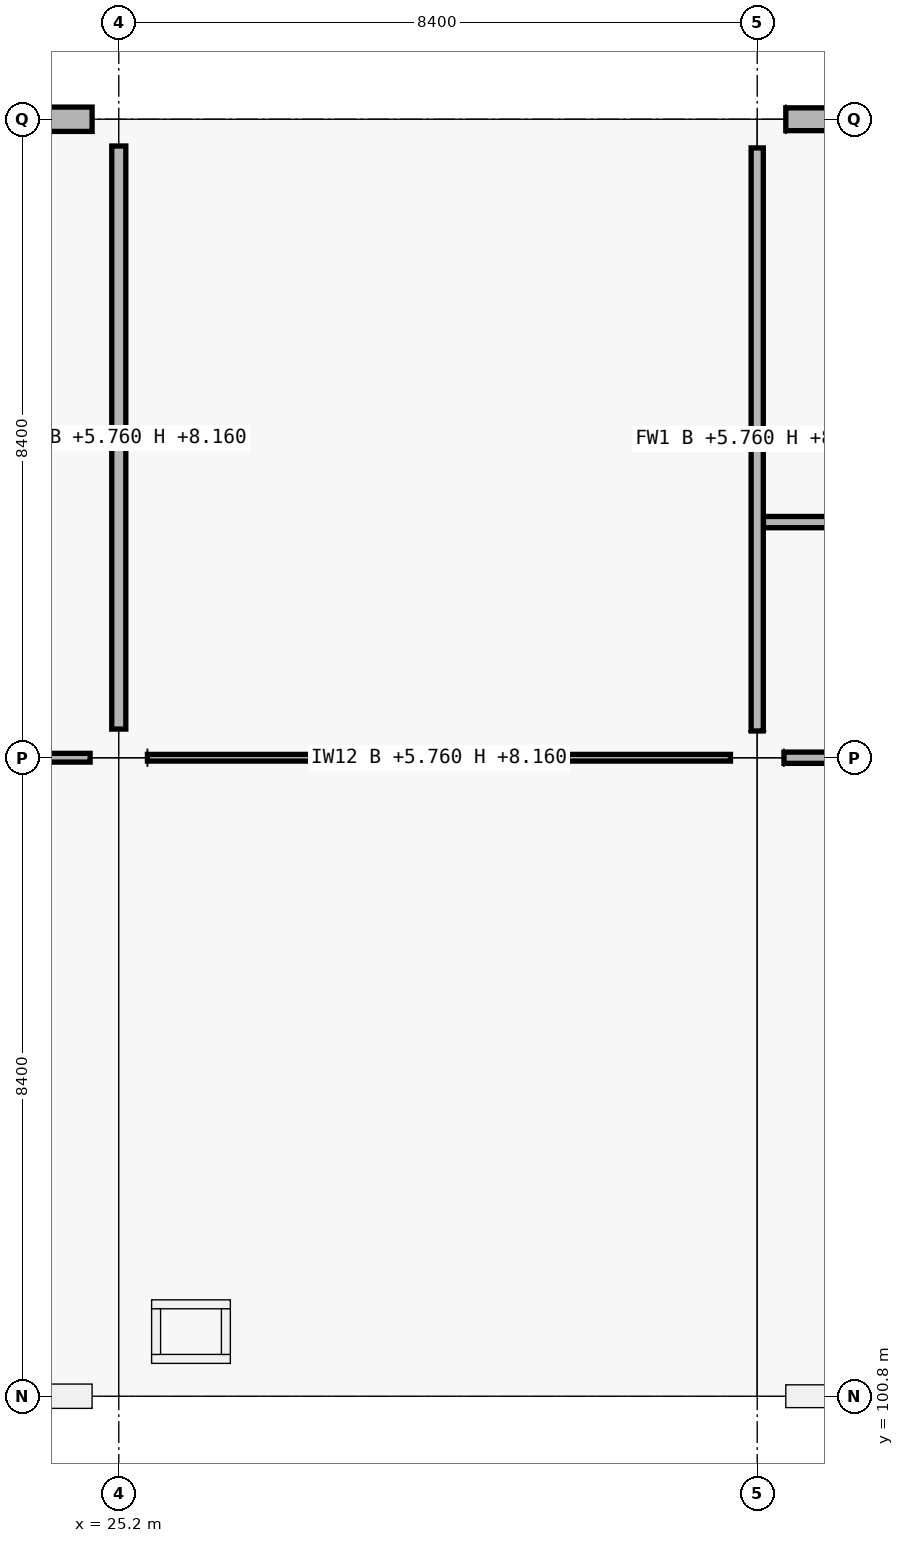
"""IFC4 building model, lengths in metres.
Left out: names, types, materials, properties, quantities, classifications, styles, units other than length and angle.
Written with IfcOpenShell. Run it as: python <this file> out.ifc"""

import sys

from ifc_helpers import new_model, si_unit, direction, frame, frame_2d, origin, origin_2d, place, context, subcontext, project, spatial, rectangle, extrude, element, fill, save


model = new_model("IFC4")
c1 = context("Model", 3, precision=1e-05, world=origin(), true_north=direction((0.0, 1.0)))
c2 = subcontext(c1, "Body", "Model", "MODEL_VIEW")
j1 = project(units=[si_unit("LENGTHUNIT", "METRE"), si_unit("PLANEANGLEUNIT", "RADIAN")], contexts=[c1])
p1 = place(None, origin())
s1 = spatial("IfcSite", under=j1, at=p1, CompositionType="ELEMENT")
p2 = place(p1, origin())
s2 = spatial("IfcBuilding", under=s1, at=p2, CompositionType="ELEMENT")
p3 = place(p2, frame((0.0, 0.0, 5.76)))
s3 = spatial("IfcBuildingStorey", under=s2, at=p3, CompositionType="ELEMENT", Elevation=5.76)
p4 = place(p3, frame((25.2, 100.8, 0.0), z_axis=(0.0, 0.0, 1.0), x_axis=(1.0, 0.0, 0.0)))
e1 = element("IfcColumn", 1, at=p4, inside=s3, PredefinedType="COLUMN", context=c2, shape_type="SweptSolid", body=[
    extrude(rectangle(XDim=0.7, YDim=0.7, at=origin_2d()), origin(), (0.0, 0.0, 1.0), 4.5),
])
p5 = place(p3, frame((25.2, 109.2, 0.0), z_axis=(0.0, 0.0, 1.0), x_axis=(1.0, 0.0, 0.0)))
e2 = element("IfcColumn", 2, at=p5, inside=s3, PredefinedType="COLUMN", context=c2, shape_type="SweptSolid", body=[
    extrude(rectangle(XDim=0.75, YDim=0.75, at=origin_2d()), origin(), (0.0, 0.0, 1.0), 4.5),
])
p6 = place(p3, frame((25.2, 117.6, 0.0), z_axis=(0.0, 0.0, 1.0), x_axis=(1.0, 0.0, 0.0)))
e3 = element("IfcColumn", 3, at=p6, inside=s3, PredefinedType="COLUMN", context=c2, shape_type="SweptSolid", body=[
    extrude(rectangle(XDim=0.7, YDim=0.7, at=origin_2d()), origin(), (0.0, 0.0, 1.0), 4.5),
])
p7 = place(p3, frame((33.6, 100.8, 0.0), z_axis=(0.0, 0.0, 1.0), x_axis=(1.0, 0.0, 0.0)))
e4 = element("IfcColumn", 4, at=p7, inside=s3, PredefinedType="COLUMN", context=c2, shape_type="SweptSolid", body=[
    extrude(rectangle(XDim=0.75, YDim=0.75, at=origin_2d()), origin(), (0.0, 0.0, 1.0), 4.5),
])
p8 = place(p3, frame((33.6, 109.2, 0.0), z_axis=(0.0, 0.0, 1.0), x_axis=(1.0, 0.0, 0.0)))
e5 = element("IfcColumn", 5, at=p8, inside=s3, PredefinedType="COLUMN", context=c2, shape_type="SweptSolid", body=[
    extrude(rectangle(XDim=0.7, YDim=0.7, at=origin_2d()), origin(), (0.0, 0.0, 1.0), 4.5),
])
p9 = place(p3, frame((33.6, 117.6, 0.0), z_axis=(0.0, 0.0, 1.0), x_axis=(1.0, 0.0, 0.0)))
e6 = element("IfcColumn", 6, at=p9, inside=s3, PredefinedType="COLUMN", context=c2, shape_type="SweptSolid", body=[
    extrude(rectangle(XDim=0.75, YDim=0.75, at=origin_2d()), origin(), (0.0, 0.0, 1.0), 4.5),
])
p10 = place(p3, frame((24.849, 100.8, 0.0), z_axis=(0.0, 0.0, 1.0), x_axis=(-1.0, 0.0, 0.0)))
e7 = element("IfcWall", 7, at=p10, inside=s3, PredefinedType="SOLIDWALL", context=c2, shape_type="SweptSolid", body=[
    extrude(rectangle(XDim=7.773, YDim=0.32, at=frame_2d((3.887, 0.0))), origin(), (0.0, 0.0, 1.0), 3.4),
])
p11 = place(p10, frame((3.436, 0.0, 0.9)))
e8 = element("IfcOpeningElement", 8, at=p11, cuts=e7, PredefinedType="OPENING", context=c2, shape_type="SweptSolid", body=[
    extrude(rectangle(XDim=0.9, YDim=1.5, at=frame_2d((0.45, 0.75))), frame((0.0, 0.16, 0.0), z_axis=(0.0, -1.0, 0.0), x_axis=(1.0, 0.0, 0.0)), (0.0, 0.0, 1.0), 0.32),
])
p12 = place(p3, frame((17.076, 117.6, 0.0), z_axis=(0.0, 0.0, 1.0), x_axis=(1.0, 0.0, 0.0)))
e9 = element("IfcWall", 9, at=p12, inside=s3, PredefinedType="SOLIDWALL", context=c2, shape_type="SweptSolid", body=[
    extrude(rectangle(XDim=7.773, YDim=0.32, at=frame_2d((3.887, 0.0))), origin(), (0.0, 0.0, 1.0), 3.4),
])
p13 = place(p12, frame((3.036, 0.0, 0.9)))
e10 = element("IfcOpeningElement", 10, at=p13, cuts=e9, PredefinedType="OPENING", context=c2, shape_type="SweptSolid", body=[
    extrude(rectangle(XDim=1.7, YDim=1.85, at=frame_2d((0.85, 0.925))), frame((0.0, 0.16, 0.0), z_axis=(0.0, -1.0, 0.0), x_axis=(1.0, 0.0, 0.0)), (0.0, 0.0, 1.0), 0.32),
])
p14 = place(p3, frame((41.574, 100.8, 0.0), z_axis=(0.0, 0.0, 1.0), x_axis=(-1.0, 0.0, 0.0)))
e11 = element("IfcWall", 11, at=p14, inside=s3, PredefinedType="SOLIDWALL", context=c2, shape_type="SweptSolid", body=[
    extrude(rectangle(XDim=7.598, YDim=0.3, at=frame_2d((3.799, 0.0))), origin(), (0.0, 0.0, 1.0), 3.4),
])
p15 = place(p14, frame((2.824, 0.0, 0.9)))
e12 = element("IfcOpeningElement", 12, at=p15, cuts=e11, PredefinedType="OPENING", context=c2, shape_type="SweptSolid", body=[
    extrude(rectangle(XDim=1.95, YDim=1.6, at=frame_2d((0.975, 0.8))), frame((0.0, 0.15, 0.0), z_axis=(0.0, -1.0, 0.0), x_axis=(1.0, 0.0, 0.0)), (0.0, 0.0, 1.0), 0.3),
])
p16 = place(p3, frame((33.976, 117.6, 0.0), z_axis=(0.0, 0.0, 1.0), x_axis=(1.0, 0.0, 0.0)))
e13 = element("IfcWall", 13, at=p16, inside=s3, PredefinedType="SOLIDWALL", context=c2, shape_type="SweptSolid", body=[
    extrude(rectangle(XDim=7.573, YDim=0.3, at=frame_2d((3.787, 0.0))), origin(), (0.0, 0.0, 1.0), 3.4),
])
p17 = place(p16, frame((2.612, 0.0, 0.9)))
e14 = element("IfcOpeningElement", 14, at=p17, cuts=e13, PredefinedType="OPENING", context=c2, shape_type="SweptSolid", body=[
    extrude(rectangle(XDim=2.35, YDim=1.6, at=frame_2d((1.175, 0.8))), frame((0.0, 0.15, 0.0), z_axis=(0.0, -1.0, 0.0), x_axis=(1.0, 0.0, 0.0)), (0.0, 0.0, 1.0), 0.3),
])
for number, where, z_axis, x_axis in (
    (15, (25.632, 101.291, 0.0), (0.0, 0.0, 1.0), (1.0, 0.0, 0.0)),
    (16, (25.632, 102.009, 0.0), (0.0, 0.0, 1.0), (1.0, 0.0, 0.0)),
):
    element("IfcWall", number, at=place(p3, frame(where, z_axis=z_axis, x_axis=x_axis)), inside=s3, PredefinedType="PARTITIONING", context=c2, shape_type="SweptSolid", body=[
        extrude(rectangle(XDim=1.036, YDim=0.118, at=frame_2d((0.518, 0.0))), origin(), (0.0, 0.0, 1.0), 3.48),
    ])
for number, where, z_axis, x_axis in (
    (17, (25.691, 101.35, 0.0), (0.0, 0.0, 1.0), (0.0, 1.0, 0.0)),
    (18, (26.609, 101.35, 0.0), (0.0, 0.0, 1.0), (0.0, 1.0, 0.0)),
):
    element("IfcWall", number, at=place(p3, frame(where, z_axis=z_axis, x_axis=x_axis)), inside=s3, PredefinedType="PARTITIONING", context=c2, shape_type="SweptSolid", body=[
        extrude(rectangle(XDim=0.6, YDim=0.118, at=frame_2d((0.3, 0.0))), origin(), (0.0, 0.0, 1.0), 3.48),
    ])
p18 = place(p3, frame((17.077, 109.2, 0.0), z_axis=(0.0, 0.0, 1.0), x_axis=(1.0, 0.0, 0.0)))
e19 = element("IfcWall", 19, at=p18, inside=s3, PredefinedType="PARTITIONING", context=c2, shape_type="SweptSolid", body=[
    extrude(rectangle(XDim=7.746, YDim=0.115, at=frame_2d((3.873, 0.0))), origin(), (0.0, 0.0, 1.0), 2.4),
])
p19 = place(p18, frame((3.368, 0.0, 0.0)))
e20 = element("IfcOpeningElement", 20, at=p19, cuts=e19, PredefinedType="OPENING", context=c2, shape_type="SweptSolid", body=[
    extrude(rectangle(XDim=1.01, YDim=2.12, at=frame_2d((0.505, 1.06))), frame((0.0, 0.058, 0.0), z_axis=(0.0, -1.0, 0.0), x_axis=(1.0, 0.0, 0.0)), (0.0, 0.0, 1.0), 0.115),
])
p20 = place(p3, frame((25.577, 109.2, 0.0), z_axis=(0.0, 0.0, 1.0), x_axis=(1.0, 0.0, 0.0)))
e21 = element("IfcWall", 21, at=p20, inside=s3, PredefinedType="PARTITIONING", context=c2, shape_type="SweptSolid", body=[
    extrude(rectangle(XDim=7.671, YDim=0.088, at=frame_2d((3.835, 0.0))), origin(), (0.0, 0.0, 1.0), 2.4),
])
p21 = place(p20, frame((3.351, 0.0, 0.0)))
e22 = element("IfcOpeningElement", 22, at=p21, cuts=e21, PredefinedType="OPENING", context=c2, shape_type="SweptSolid", body=[
    extrude(rectangle(XDim=0.97, YDim=2.12, at=frame_2d((0.485, 1.06))), frame((0.0, 0.044, 0.0), z_axis=(0.0, -1.0, 0.0), x_axis=(1.0, 0.0, 0.0)), (0.0, 0.0, 1.0), 0.088),
])
p22 = place(p3, frame((33.952, 109.2, 0.0), z_axis=(0.0, 0.0, 1.0), x_axis=(1.0, 0.0, 0.0)))
e23 = element("IfcWall", 23, at=p22, inside=s3, PredefinedType="PARTITIONING", context=c2, shape_type="SweptSolid", body=[
    extrude(rectangle(XDim=7.621, YDim=0.148, at=frame_2d((3.811, 0.0))), origin(), (0.0, 0.0, 1.0), 2.4),
])
p23 = place(p3, frame((25.2, 109.577, 0.0), z_axis=(0.0, 0.0, 1.0), x_axis=(0.0, 1.0, 0.0)))
e24 = element("IfcWall", 24, at=p23, inside=s3, PredefinedType="PARTITIONING", context=c2, shape_type="SweptSolid", body=[
    extrude(rectangle(XDim=7.671, YDim=0.185, at=frame_2d((3.835, 0.0))), origin(), (0.0, 0.0, 1.0), 2.4),
])
p24 = place(p23, frame((3.336, 0.0, 0.0)))
e25 = element("IfcOpeningElement", 25, at=p24, cuts=e24, PredefinedType="OPENING", context=c2, shape_type="SweptSolid", body=[
    extrude(rectangle(XDim=1.0, YDim=2.2, at=frame_2d((0.5, 1.1))), frame((0.0, 0.093, 0.0), z_axis=(0.0, -1.0, 0.0), x_axis=(1.0, 0.0, 0.0)), (0.0, 0.0, 1.0), 0.185),
])
p25 = place(p3, frame((33.6, 109.552, 0.0), z_axis=(0.0, 0.0, 1.0), x_axis=(0.0, 1.0, 0.0)))
e26 = element("IfcWall", 26, at=p25, inside=s3, PredefinedType="PARTITIONING", context=c2, shape_type="SweptSolid", body=[
    extrude(rectangle(XDim=7.671, YDim=0.16, at=frame_2d((3.835, 0.0))), origin(), (0.0, 0.0, 1.0), 2.4),
])
p26 = place(p3, frame((33.682, 112.3, 0.0), z_axis=(0.0, 0.0, 1.0), x_axis=(1.0, 0.0, 0.0)))
e27 = element("IfcWall", 27, at=p26, inside=s3, PredefinedType="PARTITIONING", context=c2, shape_type="SweptSolid", body=[
    extrude(rectangle(XDim=8.242, YDim=0.148, at=frame_2d((4.121, 0.0))), origin(), (0.0, 0.0, 1.0), 2.4),
])
p27 = place(p21, origin())
e28 = element("IfcDoor", 28, at=p27, inside=s3, OperationType="SINGLE_SWING_LEFT", PredefinedType="DOOR", context=c2, shape_type="SweptSolid", body=[
    extrude(rectangle(XDim=0.97, YDim=2.12, at=frame_2d((0.485, 1.06))), frame((0.0, 0.025, 0.0), z_axis=(0.0, -1.0, 0.0), x_axis=(1.0, 0.0, 0.0)), (0.0, 0.0, 1.0), 0.05),
])
fill(e22, e28)
p28 = place(p24, origin())
e29 = element("IfcDoor", 29, at=p28, inside=s3, OperationType="SINGLE_SWING_RIGHT", PredefinedType="DOOR", context=c2, shape_type="SweptSolid", body=[
    extrude(rectangle(XDim=1.0, YDim=2.2, at=frame_2d((0.5, 1.1))), frame((0.0, 0.025, 0.0), z_axis=(0.0, -1.0, 0.0), x_axis=(1.0, 0.0, 0.0)), (0.0, 0.0, 1.0), 0.05),
])
fill(e25, e29)
save(model, sys.argv[1])
